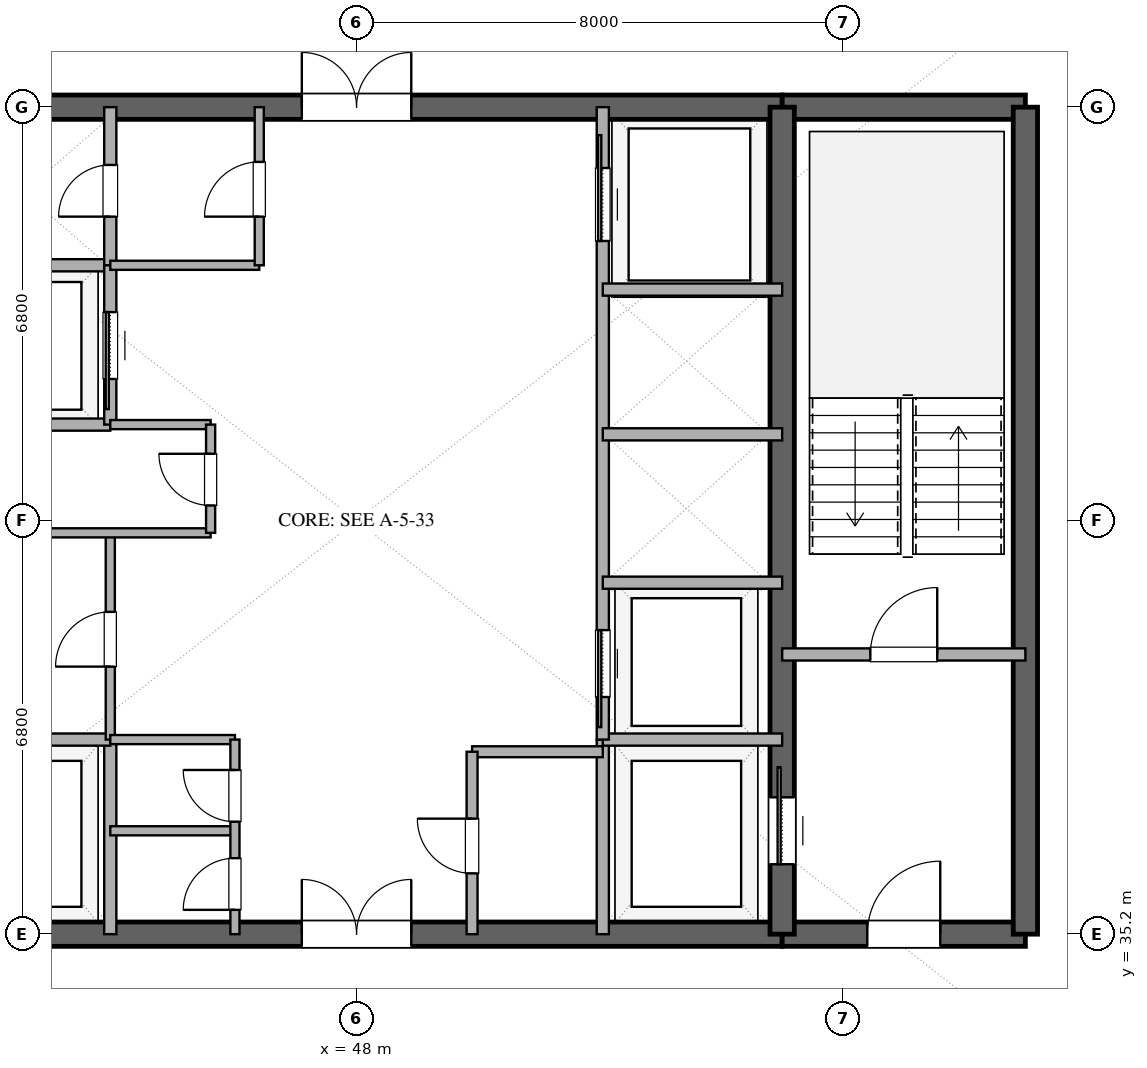
"""IFC4 building model, lengths in metres.
Left out: names, types, materials, properties, quantities, classifications, styles, units other than length and angle.
Written with IfcOpenShell. Run it as: python <this file> out.ifc"""

import sys

from ifc_helpers import new_model, si_unit, direction, frame, frame_2d, origin, place, context, subcontext, project, spatial, rectangle, extrude, element, fill, save


model = new_model("IFC4")
c1 = context("Model", 3, precision=1e-05, world=origin(), true_north=direction((0.0, 1.0)))
c2 = subcontext(c1, "Body", "Model", "MODEL_VIEW")
j1 = project(units=[si_unit("LENGTHUNIT", "METRE"), si_unit("PLANEANGLEUNIT", "RADIAN")], contexts=[c1])
p1 = place(None, origin())
s1 = spatial("IfcSite", under=j1, at=p1, CompositionType="ELEMENT")
p2 = place(p1, origin())
s2 = spatial("IfcBuilding", under=s1, at=p2, CompositionType="ELEMENT")
p3 = place(p2, frame((0.0, 0.0, 220.8)))
s3 = spatial("IfcBuildingStorey", under=s2, at=p3, CompositionType="ELEMENT", Elevation=220.8)
p4 = place(p3, frame((41.0, 35.2, 0.0), z_axis=(0.0, 0.0, 1.0), x_axis=(1.0, 0.0, 0.0)))
e1 = element("IfcWall", 1, at=p4, inside=s3, PredefinedType="SHEAR", context=c2, shape_type="SweptSolid", body=[
    extrude(rectangle(XDim=14.0, YDim=0.4, at=frame_2d((7.0, 0.0))), origin(), (0.0, 0.0, 1.0), 3.36),
])
p5 = place(p4, frame((6.1, 0.0, 0.0)))
e2 = element("IfcOpeningElement", 2, at=p5, cuts=e1, PredefinedType="OPENING", context=c2, shape_type="SweptSolid", body=[
    extrude(rectangle(XDim=1.8, YDim=2.25, at=frame_2d((0.9, 1.125))), frame((0.0, 0.21, 0.0), z_axis=(0.0, -1.0, 0.0), x_axis=(1.0, 0.0, 0.0)), (0.0, 0.0, 1.0), 0.42),
])
p6 = place(p3, frame((55.0, 35.2, 0.0), z_axis=(0.0, 0.0, 1.0), x_axis=(1.0, 0.0, 0.0)))
e3 = element("IfcWall", 3, at=p6, inside=s3, PredefinedType="SHEAR", context=c2, shape_type="SweptSolid", body=[
    extrude(rectangle(XDim=4.0, YDim=0.4, at=frame_2d((2.0, 0.0))), origin(), (0.0, 0.0, 1.0), 3.36),
])
p7 = place(p6, frame((1.4, 0.0, 0.0)))
e4 = element("IfcOpeningElement", 4, at=p7, cuts=e3, PredefinedType="OPENING", context=c2, shape_type="SweptSolid", body=[
    extrude(rectangle(XDim=1.2, YDim=2.15, at=frame_2d((0.6, 1.075))), frame((0.0, 0.21, 0.0), z_axis=(0.0, -1.0, 0.0), x_axis=(1.0, 0.0, 0.0)), (0.0, 0.0, 1.0), 0.42),
])
p8 = place(p3, frame((41.0, 48.8, 0.0), z_axis=(0.0, 0.0, 1.0), x_axis=(1.0, 0.0, 0.0)))
e5 = element("IfcWall", 5, at=p8, inside=s3, PredefinedType="SHEAR", context=c2, shape_type="SweptSolid", body=[
    extrude(rectangle(XDim=14.0, YDim=0.4, at=frame_2d((7.0, 0.0))), origin(), (0.0, 0.0, 1.0), 3.36),
])
p9 = place(p8, frame((6.1, 0.0, 0.0)))
e6 = element("IfcOpeningElement", 6, at=p9, cuts=e5, PredefinedType="OPENING", context=c2, shape_type="SweptSolid", body=[
    extrude(rectangle(XDim=1.8, YDim=2.25, at=frame_2d((0.9, 1.125))), frame((0.0, 0.21, 0.0), z_axis=(0.0, -1.0, 0.0), x_axis=(1.0, 0.0, 0.0)), (0.0, 0.0, 1.0), 0.42),
])
p10 = place(p3, frame((55.0, 48.8, 0.0), z_axis=(0.0, 0.0, 1.0), x_axis=(1.0, 0.0, 0.0)))
e7 = element("IfcWall", 7, at=p10, inside=s3, PredefinedType="SHEAR", context=c2, shape_type="SweptSolid", body=[
    extrude(rectangle(XDim=4.0, YDim=0.4, at=frame_2d((2.0, 0.0))), origin(), (0.0, 0.0, 1.0), 3.36),
])
p11 = place(p3, frame((59.0, 35.2, 0.0), z_axis=(0.0, 0.0, 1.0), x_axis=(0.0, 1.0, 0.0)))
e8 = element("IfcWall", 8, at=p11, inside=s3, PredefinedType="SHEAR", context=c2, shape_type="SweptSolid", body=[
    extrude(rectangle(XDim=13.6, YDim=0.4, at=frame_2d((6.8, 0.0))), origin(), (0.0, 0.0, 1.0), 3.36),
])
p12 = place(p3, frame((55.0, 35.2, 0.0), z_axis=(0.0, 0.0, 1.0), x_axis=(0.0, 1.0, 0.0)))
e9 = element("IfcWall", 9, at=p12, inside=s3, PredefinedType="SHEAR", context=c2, shape_type="SweptSolid", body=[
    extrude(rectangle(XDim=13.6, YDim=0.4, at=frame_2d((6.8, 0.0))), origin(), (0.0, 0.0, 1.0), 3.36),
])
p13 = place(p12, frame((1.15, 0.0, 0.0)))
e10 = element("IfcOpeningElement", 10, at=p13, cuts=e9, PredefinedType="OPENING", context=c2, shape_type="SweptSolid", body=[
    extrude(rectangle(XDim=1.1, YDim=2.2, at=frame_2d((0.55, 1.1))), frame((0.0, 0.21, 0.0), z_axis=(0.0, -1.0, 0.0), x_axis=(1.0, 0.0, 0.0)), (0.0, 0.0, 1.0), 0.42),
])
p14 = place(p3, frame((55.0, 39.8, 0.0), z_axis=(0.0, 0.0, 1.0), x_axis=(1.0, 0.0, 0.0)))
e11 = element("IfcWall", 11, at=p14, inside=s3, PredefinedType="SOLIDWALL", context=c2, shape_type="SweptSolid", body=[
    extrude(rectangle(XDim=4.0, YDim=0.2, at=frame_2d((2.0, 0.0))), origin(), (0.0, 0.0, 1.0), 2.72),
])
p15 = place(p14, frame((1.45, 0.0, 0.0)))
e12 = element("IfcOpeningElement", 12, at=p15, cuts=e11, PredefinedType="OPENING", context=c2, shape_type="SweptSolid", body=[
    extrude(rectangle(XDim=1.1, YDim=2.15, at=frame_2d((0.55, 1.075))), frame((0.0, 0.11, 0.0), z_axis=(0.0, -1.0, 0.0), x_axis=(1.0, 0.0, 0.0)), (0.0, 0.0, 1.0), 0.22),
])
p16 = place(p3, frame((43.95, 35.2, 0.0), z_axis=(0.0, 0.0, 1.0), x_axis=(0.0, 1.0, 0.0)))
e13 = element("IfcWall", 13, at=p16, inside=s3, PredefinedType="SOLIDWALL", context=c2, shape_type="SweptSolid", body=[
    extrude(rectangle(XDim=3.2, YDim=0.2, at=frame_2d((1.6, 0.0))), origin(), (0.0, 0.0, 1.0), 2.72),
])
p17 = place(p3, frame((41.0, 38.4, 0.0), z_axis=(0.0, 0.0, 1.0), x_axis=(1.0, 0.0, 0.0)))
e14 = element("IfcWall", 14, at=p17, inside=s3, PredefinedType="SOLIDWALL", context=c2, shape_type="SweptSolid", body=[
    extrude(rectangle(XDim=2.95, YDim=0.2, at=frame_2d((1.475, 0.0))), origin(), (0.0, 0.0, 1.0), 2.72),
])
p18 = place(p3, frame((52.05, 35.2, 0.0), z_axis=(0.0, 0.0, 1.0), x_axis=(0.0, 1.0, 0.0)))
e15 = element("IfcWall", 15, at=p18, inside=s3, PredefinedType="SOLIDWALL", context=c2, shape_type="SweptSolid", body=[
    extrude(rectangle(XDim=3.2, YDim=0.2, at=frame_2d((1.6, 0.0))), origin(), (0.0, 0.0, 1.0), 2.72),
])
for number, where, z_axis, x_axis in (
    (16, (52.05, 38.4, 0.0), (0.0, 0.0, 1.0), (1.0, 0.0, 0.0)),
    (17, (41.0, 46.2, 0.0), (0.0, 0.0, 1.0), (1.0, 0.0, 0.0)),
):
    element("IfcWall", number, at=place(p3, frame(where, z_axis=z_axis, x_axis=x_axis)), inside=s3, PredefinedType="SOLIDWALL", context=c2, shape_type="SweptSolid", body=[
        extrude(rectangle(XDim=2.95, YDim=0.2, at=frame_2d((1.475, 0.0))), origin(), (0.0, 0.0, 1.0), 2.72),
    ])
p19 = place(p3, frame((43.95, 46.2, 0.0), z_axis=(0.0, 0.0, 1.0), x_axis=(0.0, 1.0, 0.0)))
e18 = element("IfcWall", 18, at=p19, inside=s3, PredefinedType="SOLIDWALL", context=c2, shape_type="SweptSolid", body=[
    extrude(rectangle(XDim=2.6, YDim=0.2, at=frame_2d((1.3, 0.0))), origin(), (0.0, 0.0, 1.0), 2.72),
])
p20 = place(p19, frame((0.8, 0.0, 0.0)))
e19 = element("IfcOpeningElement", 19, at=p20, cuts=e18, PredefinedType="OPENING", context=c2, shape_type="SweptSolid", body=[
    extrude(rectangle(XDim=0.85, YDim=2.15, at=frame_2d((0.425, 1.075))), frame((0.0, 0.11, 0.0), z_axis=(0.0, -1.0, 0.0), x_axis=(1.0, 0.0, 0.0)), (0.0, 0.0, 1.0), 0.22),
])
p21 = place(p3, frame((41.0, 43.58, 0.0), z_axis=(0.0, 0.0, 1.0), x_axis=(1.0, 0.0, 0.0)))
e20 = element("IfcWall", 20, at=p21, inside=s3, PredefinedType="SOLIDWALL", context=c2, shape_type="SweptSolid", body=[
    extrude(rectangle(XDim=2.95, YDim=0.2, at=frame_2d((1.475, 0.0))), origin(), (0.0, 0.0, 1.0), 2.72),
])
p22 = place(p3, frame((43.95, 43.58, 0.0), z_axis=(0.0, 0.0, 1.0), x_axis=(0.0, 1.0, 0.0)))
e21 = element("IfcWall", 21, at=p22, inside=s3, PredefinedType="SOLIDWALL", context=c2, shape_type="SweptSolid", body=[
    extrude(rectangle(XDim=2.62, YDim=0.2, at=frame_2d((1.31, 0.0))), origin(), (0.0, 0.0, 1.0), 2.72),
])
p23 = place(p22, frame((0.75, 0.0, 0.0)))
e22 = element("IfcOpeningElement", 22, at=p23, cuts=e21, PredefinedType="OPENING", context=c2, shape_type="SweptSolid", body=[
    extrude(rectangle(XDim=1.1, YDim=2.2, at=frame_2d((0.55, 1.1))), frame((0.0, 0.11, 0.0), z_axis=(0.0, -1.0, 0.0), x_axis=(1.0, 0.0, 0.0)), (0.0, 0.0, 1.0), 0.22),
])
p24 = place(p3, frame((43.95, 38.4, 0.0), z_axis=(0.0, 0.0, 1.0), x_axis=(0.0, 1.0, 0.0)))
e23 = element("IfcWall", 23, at=p24, inside=s3, PredefinedType="PARTITIONING", context=c2, shape_type="SweptSolid", body=[
    extrude(rectangle(XDim=3.4, YDim=0.15, at=frame_2d((1.7, 0.0))), origin(), (0.0, 0.0, 1.0), 2.72),
])
p25 = place(p24, frame((1.2, 0.0, 0.0)))
e24 = element("IfcOpeningElement", 24, at=p25, cuts=e23, PredefinedType="OPENING", context=c2, shape_type="SweptSolid", body=[
    extrude(rectangle(XDim=0.9, YDim=2.15, at=frame_2d((0.45, 1.075))), frame((0.0, 0.085, 0.0), z_axis=(0.0, -1.0, 0.0), x_axis=(1.0, 0.0, 0.0)), (0.0, 0.0, 1.0), 0.17),
])
p26 = place(p3, frame((41.0, 41.8, 0.0), z_axis=(0.0, 0.0, 1.0), x_axis=(1.0, 0.0, 0.0)))
e25 = element("IfcWall", 25, at=p26, inside=s3, PredefinedType="PARTITIONING", context=c2, shape_type="SweptSolid", body=[
    extrude(rectangle(XDim=4.6, YDim=0.15, at=frame_2d((2.3, 0.0))), origin(), (0.0, 0.0, 1.0), 2.72),
])
p27 = place(p3, frame((43.95, 43.58, 0.0), z_axis=(0.0, 0.0, 1.0), x_axis=(1.0, 0.0, 0.0)))
e26 = element("IfcWall", 26, at=p27, inside=s3, PredefinedType="PARTITIONING", context=c2, shape_type="SweptSolid", body=[
    extrude(rectangle(XDim=1.65, YDim=0.15, at=frame_2d((0.825, 0.0))), origin(), (0.0, 0.0, 1.0), 2.72),
])
p28 = place(p3, frame((45.6, 41.8, 0.0), z_axis=(0.0, 0.0, 1.0), x_axis=(0.0, 1.0, 0.0)))
e27 = element("IfcWall", 27, at=p28, inside=s3, PredefinedType="PARTITIONING", context=c2, shape_type="SweptSolid", body=[
    extrude(rectangle(XDim=1.78, YDim=0.15, at=frame_2d((0.89, 0.0))), origin(), (0.0, 0.0, 1.0), 2.72),
])
p29 = place(p28, frame((0.45, 0.0, 0.0)))
e28 = element("IfcOpeningElement", 28, at=p29, cuts=e27, PredefinedType="OPENING", context=c2, shape_type="SweptSolid", body=[
    extrude(rectangle(XDim=0.85, YDim=2.15, at=frame_2d((0.425, 1.075))), frame((0.0, 0.085, 0.0), z_axis=(0.0, -1.0, 0.0), x_axis=(1.0, 0.0, 0.0)), (0.0, 0.0, 1.0), 0.17),
])
p30 = place(p3, frame((52.05, 38.4, 0.0), z_axis=(0.0, 0.0, 1.0), x_axis=(0.0, 1.0, 0.0)))
e29 = element("IfcWall", 29, at=p30, inside=s3, PredefinedType="SOLIDWALL", context=c2, shape_type="SweptSolid", body=[
    extrude(rectangle(XDim=10.4, YDim=0.2, at=frame_2d((5.2, 0.0))), origin(), (0.0, 0.0, 1.0), 2.72),
])
p31 = place(p30, frame((0.7, 0.0, 0.0)))
e30 = element("IfcOpeningElement", 30, at=p31, cuts=e29, PredefinedType="OPENING", context=c2, shape_type="SweptSolid", body=[
    extrude(rectangle(XDim=1.1, YDim=2.2, at=frame_2d((0.55, 1.1))), frame((0.0, 0.11, 0.0), z_axis=(0.0, -1.0, 0.0), x_axis=(1.0, 0.0, 0.0)), (0.0, 0.0, 1.0), 0.22),
])
p32 = place(p30, frame((8.2, 0.0, 0.0)))
e31 = element("IfcOpeningElement", 31, at=p32, cuts=e29, PredefinedType="OPENING", context=c2, shape_type="SweptSolid", body=[
    extrude(rectangle(XDim=1.2, YDim=2.2, at=frame_2d((0.6, 1.1))), frame((0.0, 0.11, 0.0), z_axis=(0.0, -1.0, 0.0), x_axis=(1.0, 0.0, 0.0)), (0.0, 0.0, 1.0), 0.22),
])
for number, where, z_axis, x_axis in (
    (32, (52.05, 40.98, 0.0), (0.0, 0.0, 1.0), (1.0, 0.0, 0.0)),
    (33, (52.05, 43.42, 0.0), (0.0, 0.0, 1.0), (1.0, 0.0, 0.0)),
    (34, (52.05, 45.8, 0.0), (0.0, 0.0, 1.0), (1.0, 0.0, 0.0)),
):
    element("IfcWall", number, at=place(p3, frame(where, z_axis=z_axis, x_axis=x_axis)), inside=s3, PredefinedType="SOLIDWALL", context=c2, shape_type="SweptSolid", body=[
        extrude(rectangle(XDim=2.95, YDim=0.2, at=frame_2d((1.475, 0.0))), origin(), (0.0, 0.0, 1.0), 2.72),
    ])
for number, where, z_axis, x_axis in (
    (35, (43.95, 36.9, 0.0), (0.0, 0.0, 1.0), (1.0, 0.0, 0.0)),
    (36, (43.95, 38.4, 0.0), (0.0, 0.0, 1.0), (1.0, 0.0, 0.0)),
):
    element("IfcWall", number, at=place(p3, frame(where, z_axis=z_axis, x_axis=x_axis)), inside=s3, PredefinedType="PARTITIONING", context=c2, shape_type="SweptSolid", body=[
        extrude(rectangle(XDim=2.05, YDim=0.15, at=frame_2d((1.025, 0.0))), origin(), (0.0, 0.0, 1.0), 2.72),
    ])
p33 = place(p3, frame((46.0, 35.2, 0.0), z_axis=(0.0, 0.0, 1.0), x_axis=(0.0, 1.0, 0.0)))
e37 = element("IfcWall", 37, at=p33, inside=s3, PredefinedType="PARTITIONING", context=c2, shape_type="SweptSolid", body=[
    extrude(rectangle(XDim=3.2, YDim=0.15, at=frame_2d((1.6, 0.0))), origin(), (0.0, 0.0, 1.0), 2.72),
])
p34 = place(p33, frame((0.4, 0.0, 0.0)))
e38 = element("IfcOpeningElement", 38, at=p34, cuts=e37, PredefinedType="OPENING", context=c2, shape_type="SweptSolid", body=[
    extrude(rectangle(XDim=0.85, YDim=2.15, at=frame_2d((0.425, 1.075))), frame((0.0, 0.085, 0.0), z_axis=(0.0, -1.0, 0.0), x_axis=(1.0, 0.0, 0.0)), (0.0, 0.0, 1.0), 0.17),
])
p35 = place(p33, frame((1.85, 0.0, 0.0)))
e39 = element("IfcOpeningElement", 39, at=p35, cuts=e37, PredefinedType="OPENING", context=c2, shape_type="SweptSolid", body=[
    extrude(rectangle(XDim=0.85, YDim=2.15, at=frame_2d((0.425, 1.075))), frame((0.0, 0.085, 0.0), z_axis=(0.0, -1.0, 0.0), x_axis=(1.0, 0.0, 0.0)), (0.0, 0.0, 1.0), 0.17),
])
p36 = place(p3, frame((43.95, 46.2, 0.0), z_axis=(0.0, 0.0, 1.0), x_axis=(1.0, 0.0, 0.0)))
e40 = element("IfcWall", 40, at=p36, inside=s3, PredefinedType="PARTITIONING", context=c2, shape_type="SweptSolid", body=[
    extrude(rectangle(XDim=2.45, YDim=0.15, at=frame_2d((1.225, 0.0))), origin(), (0.0, 0.0, 1.0), 2.72),
])
p37 = place(p3, frame((46.4, 46.2, 0.0), z_axis=(0.0, 0.0, 1.0), x_axis=(0.0, 1.0, 0.0)))
e41 = element("IfcWall", 41, at=p37, inside=s3, PredefinedType="PARTITIONING", context=c2, shape_type="SweptSolid", body=[
    extrude(rectangle(XDim=2.6, YDim=0.15, at=frame_2d((1.3, 0.0))), origin(), (0.0, 0.0, 1.0), 2.72),
])
p38 = place(p37, frame((0.8, 0.0, 0.0)))
e42 = element("IfcOpeningElement", 42, at=p38, cuts=e41, PredefinedType="OPENING", context=c2, shape_type="SweptSolid", body=[
    extrude(rectangle(XDim=0.9, YDim=2.15, at=frame_2d((0.45, 1.075))), frame((0.0, 0.085, 0.0), z_axis=(0.0, -1.0, 0.0), x_axis=(1.0, 0.0, 0.0)), (0.0, 0.0, 1.0), 0.17),
])
p39 = place(p3, frame((49.9, 38.2, 0.0), z_axis=(0.0, 0.0, 1.0), x_axis=(1.0, 0.0, 0.0)))
e43 = element("IfcWall", 43, at=p39, inside=s3, PredefinedType="PLUMBINGWALL", context=c2, shape_type="SweptSolid", body=[
    extrude(rectangle(XDim=2.15, YDim=0.18, at=frame_2d((1.075, 0.0))), origin(), (0.0, 0.0, 1.0), 2.72),
])
p40 = place(p3, frame((49.9, 35.2, 0.0), z_axis=(0.0, 0.0, 1.0), x_axis=(0.0, 1.0, 0.0)))
e44 = element("IfcWall", 44, at=p40, inside=s3, PredefinedType="PLUMBINGWALL", context=c2, shape_type="SweptSolid", body=[
    extrude(rectangle(XDim=3.0, YDim=0.18, at=frame_2d((1.5, 0.0))), origin(), (0.0, 0.0, 1.0), 2.72),
])
p41 = place(p40, frame((1.0, 0.0, 0.0)))
e45 = element("IfcOpeningElement", 45, at=p41, cuts=e44, PredefinedType="OPENING", context=c2, shape_type="SweptSolid", body=[
    extrude(rectangle(XDim=0.9, YDim=2.1, at=frame_2d((0.45, 1.05))), frame((0.0, 0.1, 0.0), z_axis=(0.0, -1.0, 0.0), x_axis=(1.0, 0.0, 0.0)), (0.0, 0.0, 1.0), 0.2),
])
p42 = place(p13, origin())
e46 = element("IfcDoor", 46, at=p42, inside=s3, OperationType="SLIDING_TO_RIGHT", PredefinedType="DOOR", context=c2, shape_type="SweptSolid", body=[
    extrude(rectangle(XDim=1.1, YDim=2.2, at=frame_2d((0.55, 1.1))), frame((0.0, 0.025, 0.0), z_axis=(0.0, -1.0, 0.0), x_axis=(1.0, 0.0, 0.0)), (0.0, 0.0, 1.0), 0.05),
])
fill(e10, e46)
p43 = place(p7, origin())
e47 = element("IfcDoor", 47, at=p43, inside=s3, OperationType="SINGLE_SWING_RIGHT", PredefinedType="DOOR", context=c2, shape_type="SweptSolid", body=[
    extrude(rectangle(XDim=1.2, YDim=2.15, at=frame_2d((0.6, 1.075))), frame((0.0, 0.025, 0.0), z_axis=(0.0, -1.0, 0.0), x_axis=(1.0, 0.0, 0.0)), (0.0, 0.0, 1.0), 0.05),
])
fill(e4, e47)
p44 = place(p5, origin())
e48 = element("IfcDoor", 48, at=p44, inside=s3, OperationType="DOUBLE_DOOR_SINGLE_SWING", PredefinedType="DOOR", context=c2, shape_type="SweptSolid", body=[
    extrude(rectangle(XDim=1.8, YDim=2.25, at=frame_2d((0.9, 1.125))), frame((0.0, 0.025, 0.0), z_axis=(0.0, -1.0, 0.0), x_axis=(1.0, 0.0, 0.0)), (0.0, 0.0, 1.0), 0.05),
])
fill(e2, e48)
p45 = place(p9, origin())
e49 = element("IfcDoor", 49, at=p45, inside=s3, OperationType="DOUBLE_DOOR_SINGLE_SWING", PredefinedType="DOOR", context=c2, shape_type="SweptSolid", body=[
    extrude(rectangle(XDim=1.8, YDim=2.25, at=frame_2d((0.9, 1.125))), frame((0.0, 0.025, 0.0), z_axis=(0.0, -1.0, 0.0), x_axis=(1.0, 0.0, 0.0)), (0.0, 0.0, 1.0), 0.05),
])
fill(e6, e49)
p46 = place(p15, origin())
e50 = element("IfcDoor", 50, at=p46, inside=s3, OperationType="SINGLE_SWING_RIGHT", PredefinedType="DOOR", context=c2, shape_type="SweptSolid", body=[
    extrude(rectangle(XDim=1.1, YDim=2.15, at=frame_2d((0.55, 1.075))), frame((0.0, 0.025, 0.0), z_axis=(0.0, -1.0, 0.0), x_axis=(1.0, 0.0, 0.0)), (0.0, 0.0, 1.0), 0.05),
])
fill(e12, e50)
p47 = place(p20, origin())
e51 = element("IfcDoor", 51, at=p47, inside=s3, OperationType="SINGLE_SWING_LEFT", PredefinedType="DOOR", context=c2, shape_type="SweptSolid", body=[
    extrude(rectangle(XDim=0.85, YDim=2.15, at=frame_2d((0.425, 1.075))), frame((0.0, 0.025, 0.0), z_axis=(0.0, -1.0, 0.0), x_axis=(1.0, 0.0, 0.0)), (0.0, 0.0, 1.0), 0.05),
])
fill(e19, e51)
p48 = place(p23, origin())
e52 = element("IfcDoor", 52, at=p48, inside=s3, OperationType="SLIDING_TO_LEFT", PredefinedType="DOOR", context=c2, shape_type="SweptSolid", body=[
    extrude(rectangle(XDim=1.1, YDim=2.2, at=frame_2d((0.55, 1.1))), frame((0.0, 0.025, 0.0), z_axis=(0.0, -1.0, 0.0), x_axis=(1.0, 0.0, 0.0)), (0.0, 0.0, 1.0), 0.05),
])
fill(e22, e52)
p49 = place(p25, origin())
e53 = element("IfcDoor", 53, at=p49, inside=s3, OperationType="SINGLE_SWING_LEFT", PredefinedType="DOOR", context=c2, shape_type="SweptSolid", body=[
    extrude(rectangle(XDim=0.9, YDim=2.15, at=frame_2d((0.45, 1.075))), frame((0.0, 0.025, 0.0), z_axis=(0.0, -1.0, 0.0), x_axis=(1.0, 0.0, 0.0)), (0.0, 0.0, 1.0), 0.05),
])
fill(e24, e53)
p50 = place(p29, origin())
e54 = element("IfcDoor", 54, at=p50, inside=s3, OperationType="SINGLE_SWING_RIGHT", PredefinedType="DOOR", context=c2, shape_type="SweptSolid", body=[
    extrude(rectangle(XDim=0.85, YDim=2.15, at=frame_2d((0.425, 1.075))), frame((0.0, 0.025, 0.0), z_axis=(0.0, -1.0, 0.0), x_axis=(1.0, 0.0, 0.0)), (0.0, 0.0, 1.0), 0.05),
])
fill(e28, e54)
p51 = place(p31, origin())
e55 = element("IfcDoor", 55, at=p51, inside=s3, OperationType="SLIDING_TO_LEFT", PredefinedType="DOOR", context=c2, shape_type="SweptSolid", body=[
    extrude(rectangle(XDim=1.1, YDim=2.2, at=frame_2d((0.55, 1.1))), frame((0.0, 0.025, 0.0), z_axis=(0.0, -1.0, 0.0), x_axis=(1.0, 0.0, 0.0)), (0.0, 0.0, 1.0), 0.05),
])
fill(e30, e55)
p52 = place(p32, origin())
e56 = element("IfcDoor", 56, at=p52, inside=s3, OperationType="SLIDING_TO_RIGHT", PredefinedType="DOOR", context=c2, shape_type="SweptSolid", body=[
    extrude(rectangle(XDim=1.2, YDim=2.2, at=frame_2d((0.6, 1.1))), frame((0.0, 0.025, 0.0), z_axis=(0.0, -1.0, 0.0), x_axis=(1.0, 0.0, 0.0)), (0.0, 0.0, 1.0), 0.05),
])
fill(e31, e56)
p53 = place(p34, origin())
e57 = element("IfcDoor", 57, at=p53, inside=s3, OperationType="SINGLE_SWING_LEFT", PredefinedType="DOOR", context=c2, shape_type="SweptSolid", body=[
    extrude(rectangle(XDim=0.85, YDim=2.15, at=frame_2d((0.425, 1.075))), frame((0.0, 0.025, 0.0), z_axis=(0.0, -1.0, 0.0), x_axis=(1.0, 0.0, 0.0)), (0.0, 0.0, 1.0), 0.05),
])
fill(e38, e57)
p54 = place(p35, origin())
e58 = element("IfcDoor", 58, at=p54, inside=s3, OperationType="SINGLE_SWING_RIGHT", PredefinedType="DOOR", context=c2, shape_type="SweptSolid", body=[
    extrude(rectangle(XDim=0.85, YDim=2.15, at=frame_2d((0.425, 1.075))), frame((0.0, 0.025, 0.0), z_axis=(0.0, -1.0, 0.0), x_axis=(1.0, 0.0, 0.0)), (0.0, 0.0, 1.0), 0.05),
])
fill(e39, e58)
p55 = place(p38, origin())
e59 = element("IfcDoor", 59, at=p55, inside=s3, OperationType="SINGLE_SWING_LEFT", PredefinedType="DOOR", context=c2, shape_type="SweptSolid", body=[
    extrude(rectangle(XDim=0.9, YDim=2.15, at=frame_2d((0.45, 1.075))), frame((0.0, 0.025, 0.0), z_axis=(0.0, -1.0, 0.0), x_axis=(1.0, 0.0, 0.0)), (0.0, 0.0, 1.0), 0.05),
])
fill(e42, e59)
p56 = place(p41, origin())
e60 = element("IfcDoor", 60, at=p56, inside=s3, OperationType="SINGLE_SWING_RIGHT", PredefinedType="DOOR", context=c2, shape_type="SweptSolid", body=[
    extrude(rectangle(XDim=0.9, YDim=2.1, at=frame_2d((0.45, 1.05))), frame((0.0, 0.025, 0.0), z_axis=(0.0, -1.0, 0.0), x_axis=(1.0, 0.0, 0.0)), (0.0, 0.0, 1.0), 0.05),
])
fill(e45, e60)
save(model, sys.argv[1])
